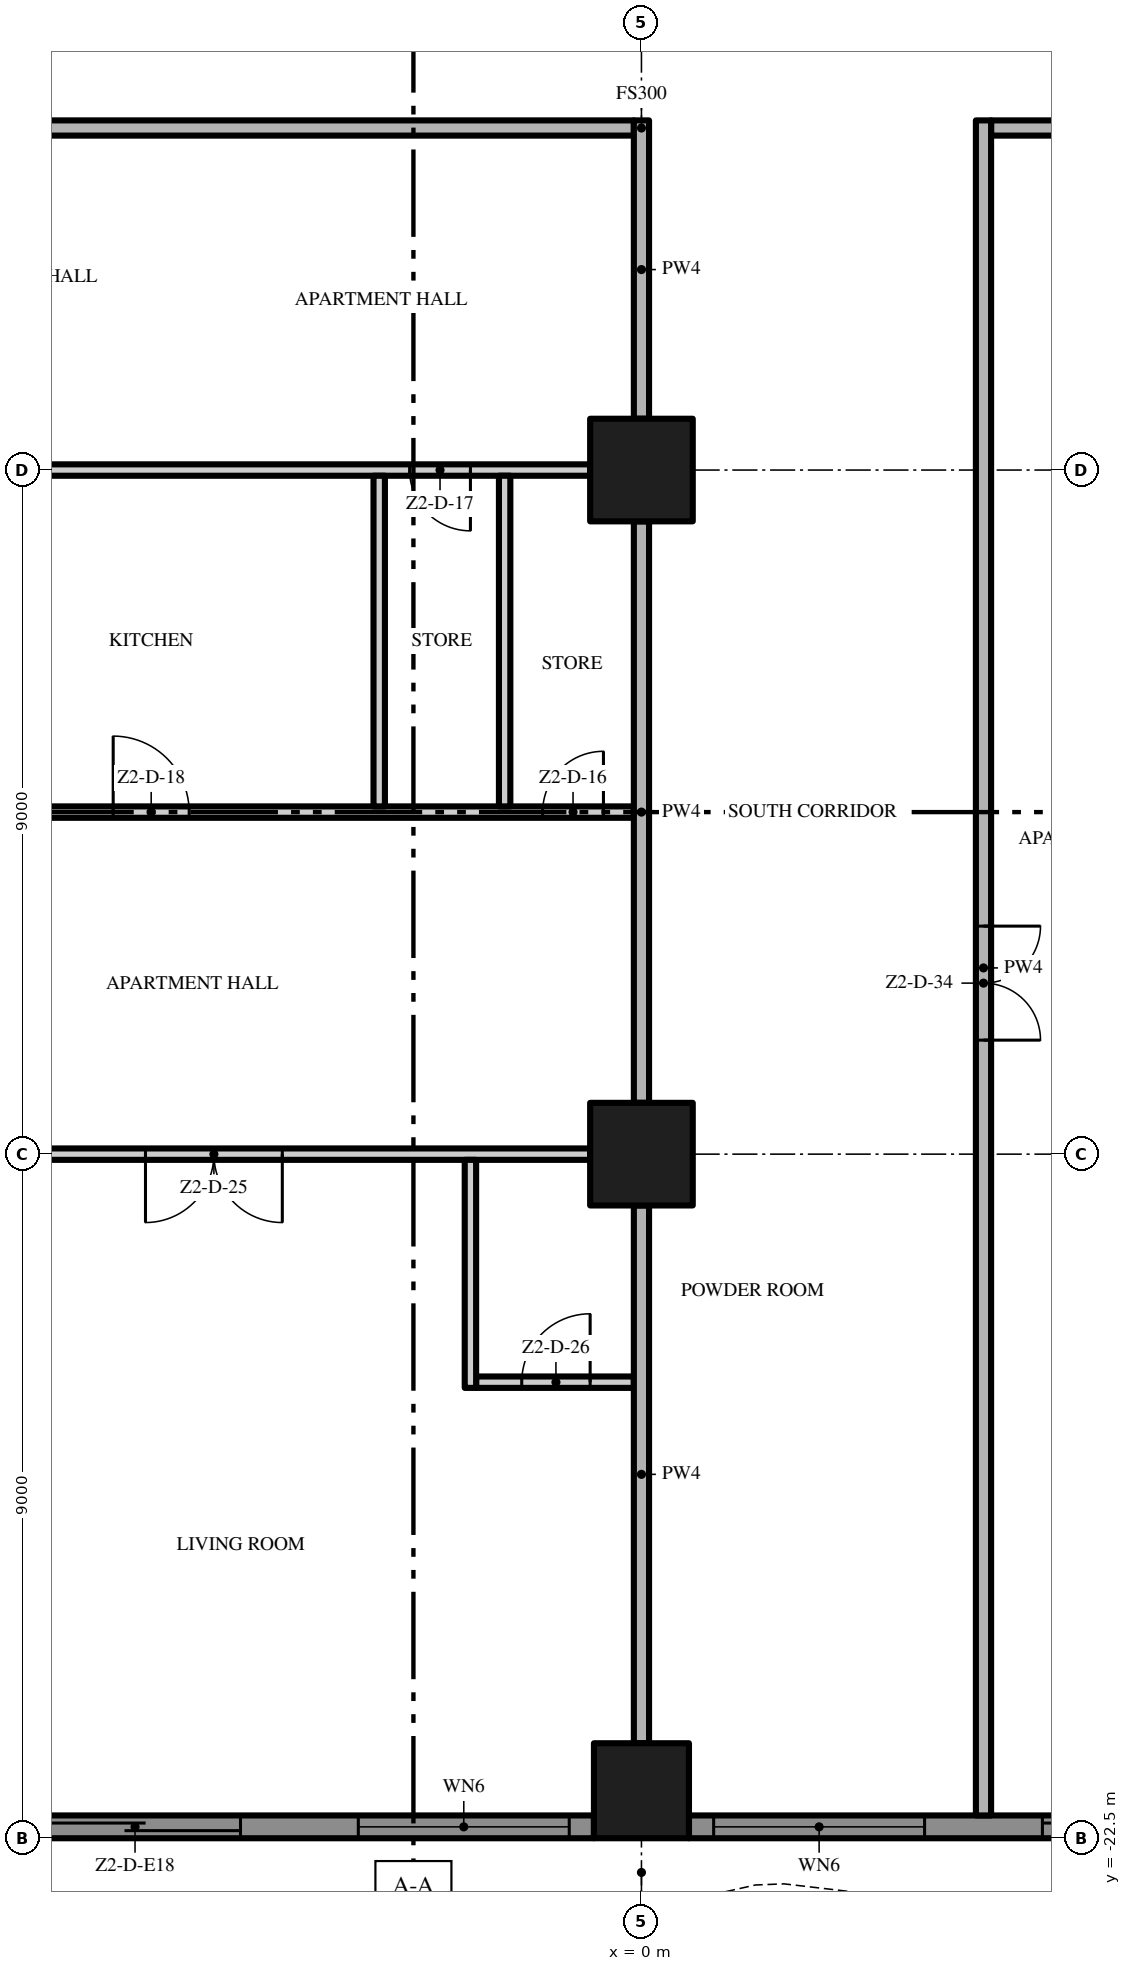
"""IFC4 building model, lengths in metres.
Left out: names, types, materials, properties, quantities, classifications, styles, units other than length and angle.
Written with IfcOpenShell. Run it as: python <this file> out.ifc"""

import sys

from ifc_helpers import new_model, si_unit, direction, frame, frame_2d, origin, origin_2d, place, context, subcontext, project, spatial, polyline, rectangle, outline, extrude, element, fill, save


model = new_model("IFC4")
c1 = context("Model", 3, precision=1e-05, world=origin(), true_north=direction((0.0, 1.0)))
c2 = subcontext(c1, "Body", "Model", "MODEL_VIEW")
j1 = project(units=[si_unit("LENGTHUNIT", "METRE"), si_unit("PLANEANGLEUNIT", "RADIAN")], contexts=[c1])
p1 = place(None, origin())
s1 = spatial("IfcSite", under=j1, at=p1, CompositionType="ELEMENT")
p2 = place(p1, origin())
s2 = spatial("IfcBuilding", under=s1, at=p2, CompositionType="ELEMENT")
p3 = place(p2, frame((0.0, 0.0, 111.2)))
s3 = spatial("IfcBuildingStorey", under=s2, at=p3, CompositionType="ELEMENT", Elevation=111.2)
p4 = place(p3, frame((0.0, -13.5, 0.0), z_axis=(0.0, 0.0, 1.0), x_axis=(1.0, 0.0, 0.0)))
e1 = element("IfcColumn", 1, at=p4, inside=s3, PredefinedType="COLUMN", context=c2, shape_type="SweptSolid", body=[
    extrude(rectangle(XDim=1.35, YDim=1.35, at=origin_2d()), origin(), (0.0, 0.0, 1.0), 3.5),
])
p5 = place(p3, frame((0.0, -21.875, 0.0), z_axis=(0.0, 0.0, 1.0), x_axis=(1.0, 0.0, 0.0)))
e2 = element("IfcColumn", 2, at=p5, inside=s3, PredefinedType="COLUMN", context=c2, shape_type="SweptSolid", body=[
    extrude(rectangle(XDim=1.25, YDim=1.25, at=origin_2d()), origin(), (0.0, 0.0, 1.0), 3.5),
])
p6 = place(p3, frame((0.0, -4.5, 0.0), z_axis=(0.0, 0.0, 1.0), x_axis=(1.0, 0.0, 0.0)))
e3 = element("IfcColumn", 3, at=p6, inside=s3, PredefinedType="COLUMN", context=c2, shape_type="SweptSolid", body=[
    extrude(rectangle(XDim=1.35, YDim=1.35, at=origin_2d()), origin(), (0.0, 0.0, 1.0), 3.5),
])
p7 = place(p3, frame((-0.625, -22.35, 0.0), z_axis=(0.0, 0.0, 1.0), x_axis=(-1.0, 0.0, 0.0)))
e4 = element("IfcWall", 4, at=p7, inside=s3, PredefinedType="SOLIDWALL", context=c2, shape_type="SweptSolid", body=[
    extrude(rectangle(XDim=7.75, YDim=0.3, at=frame_2d((3.875, 0.0))), origin(), (0.0, 0.0, 1.0), 3.5),
])
p8 = place(p7, frame((4.65, 0.0, 0.0)))
e5 = element("IfcOpeningElement", 5, at=p8, cuts=e4, PredefinedType="OPENING", context=c2, shape_type="SweptSolid", body=[
    extrude(rectangle(XDim=2.775, YDim=2.4, at=frame_2d((1.387, 1.2))), frame((0.0, 0.16, 0.0), z_axis=(0.0, -1.0, 0.0), x_axis=(1.0, 0.0, 0.0)), (0.0, 0.0, 1.0), 0.32),
])
p9 = place(p7, frame((0.325, 0.0, 0.45)))
e6 = element("IfcOpeningElement", 6, at=p9, cuts=e4, PredefinedType="OPENING", context=c2, shape_type="SweptSolid", body=[
    extrude(rectangle(XDim=2.775, YDim=2.65, at=frame_2d((1.387, 1.325))), frame((0.0, 0.16, 0.0), z_axis=(0.0, -1.0, 0.0), x_axis=(1.0, 0.0, 0.0)), (0.0, 0.0, 1.0), 0.32),
])
p10 = place(p3, frame((8.375, -22.35, 0.0), z_axis=(0.0, 0.0, 1.0), x_axis=(-1.0, 0.0, 0.0)))
e7 = element("IfcWall", 7, at=p10, inside=s3, PredefinedType="SOLIDWALL", context=c2, shape_type="SweptSolid", body=[
    extrude(rectangle(XDim=7.75, YDim=0.3, at=frame_2d((3.875, 0.0))), origin(), (0.0, 0.0, 1.0), 3.5),
])
p11 = place(p10, frame((4.65, 0.0, 0.45)))
e8 = element("IfcOpeningElement", 8, at=p11, cuts=e7, PredefinedType="OPENING", context=c2, shape_type="SweptSolid", body=[
    extrude(rectangle(XDim=2.775, YDim=2.65, at=frame_2d((1.387, 1.325))), frame((0.0, 0.16, 0.0), z_axis=(0.0, -1.0, 0.0), x_axis=(1.0, 0.0, 0.0)), (0.0, 0.0, 1.0), 0.32),
])
p12 = place(p10, frame((0.325, 0.0, 0.0)))
e9 = element("IfcOpeningElement", 9, at=p12, cuts=e7, PredefinedType="OPENING", context=c2, shape_type="SweptSolid", body=[
    extrude(rectangle(XDim=2.775, YDim=2.4, at=frame_2d((1.387, 1.2))), frame((0.0, 0.16, 0.0), z_axis=(0.0, -1.0, 0.0), x_axis=(1.0, 0.0, 0.0)), (0.0, 0.0, 1.0), 0.32),
])
p13 = place(p3, origin())
e10 = element("IfcWall", 10, at=p13, inside=s3, PredefinedType="USERDEFINED", context=c2, shape_type="SweptSolid", body=[
    extrude(outline(polyline([(-22.5, -25.149), (-21.0, -25.485), (-20.625, -25.5), (-19.5, -25.369), (-18.0, -24.845), (-16.5, -24.112), (-15.0, -23.451), (-13.5, -23.115), (-13.125, -23.1), (-12.0, -23.231), (-10.5, -23.755), (-9.0, -24.488), (-7.5, -25.149), (-6.0, -25.485), (-5.625, -25.5), (-4.5, -25.369), (-3.0, -24.845), (-1.5, -24.112), (0.0, -23.451), (1.5, -23.115), (1.875, -23.1), (3.0, -23.231), (4.5, -23.755), (6.0, -24.488), (7.5, -25.149), (9.0, -25.485), (9.375, -25.5), (10.5, -25.369), (12.0, -24.845), (13.5, -24.112), (15.0, -23.451), (16.5, -23.115), (16.875, -23.1), (18.0, -23.231), (19.5, -23.755), (21.0, -24.488), (22.5, -25.149), (22.601, -24.92), (21.105, -24.261), (19.596, -23.524), (18.056, -22.986), (16.885, -22.849), (16.467, -22.866), (14.921, -23.213), (13.395, -23.885), (11.904, -24.614), (10.444, -25.124), (9.365, -25.249), (9.033, -25.236), (7.579, -24.91), (6.105, -24.261), (4.596, -23.524), (3.056, -22.986), (1.885, -22.849), (1.467, -22.866), (-0.079, -23.213), (-1.605, -23.885), (-3.096, -24.614), (-4.556, -25.124), (-5.635, -25.249), (-5.967, -25.236), (-7.421, -24.91), (-8.895, -24.261), (-10.404, -23.524), (-11.944, -22.986), (-13.115, -22.849), (-13.533, -22.866), (-15.079, -23.213), (-16.605, -23.885), (-18.096, -24.614), (-19.556, -25.124), (-20.635, -25.249), (-20.967, -25.236), (-22.445, -24.905), (-22.5, -25.149)])), origin(), (0.0, 0.0, 1.0), 0.9),
])
p14 = place(p3, frame((-2.175, -16.5, 0.0), z_axis=(0.0, 0.0, 1.0), x_axis=(1.0, 0.0, 0.0)))
e11 = element("IfcWall", 11, at=p14, inside=s3, PredefinedType="PARTITIONING", context=c2, shape_type="SweptSolid", body=[
    extrude(rectangle(XDim=2.075, YDim=0.15, at=frame_2d((1.038, 0.0))), origin(), (0.0, 0.0, 1.0), 3.5),
])
p15 = place(p14, frame((0.6, 0.0, 0.0)))
e12 = element("IfcOpeningElement", 12, at=p15, cuts=e11, PredefinedType="OPENING", context=c2, shape_type="SweptSolid", body=[
    extrude(rectangle(XDim=0.9, YDim=2.1, at=frame_2d((0.45, 1.05))), frame((0.0, 0.085, 0.0), z_axis=(0.0, -1.0, 0.0), x_axis=(1.0, 0.0, 0.0)), (0.0, 0.0, 1.0), 0.17),
])
p16 = place(p3, frame((-0.675, -13.5, 0.0), z_axis=(0.0, 0.0, 1.0), x_axis=(-1.0, 0.0, 0.0)))
e13 = element("IfcWall", 13, at=p16, inside=s3, PredefinedType="PARTITIONING", context=c2, shape_type="SweptSolid", body=[
    extrude(rectangle(XDim=7.65, YDim=0.15, at=frame_2d((3.825, 0.0))), origin(), (0.0, 0.0, 1.0), 3.5),
])
p17 = place(p16, frame((4.05, 0.0, 0.0)))
e14 = element("IfcOpeningElement", 14, at=p17, cuts=e13, PredefinedType="OPENING", context=c2, shape_type="SweptSolid", body=[
    extrude(rectangle(XDim=1.8, YDim=2.4, at=frame_2d((0.9, 1.2))), frame((0.0, 0.085, 0.0), z_axis=(0.0, -1.0, 0.0), x_axis=(1.0, 0.0, 0.0)), (0.0, 0.0, 1.0), 0.17),
])
p18 = place(p3, frame((-11.625, -9.0, 0.0), z_axis=(0.0, 0.0, 1.0), x_axis=(1.0, 0.0, 0.0)))
e15 = element("IfcWall", 15, at=p18, inside=s3, PredefinedType="PARTITIONING", context=c2, shape_type="SweptSolid", body=[
    extrude(rectangle(XDim=11.525, YDim=0.15, at=frame_2d((5.763, 0.0))), origin(), (0.0, 0.0, 1.0), 3.5),
])
p19 = place(p18, frame((10.325, 0.0, 0.0)))
e16 = element("IfcOpeningElement", 16, at=p19, cuts=e15, PredefinedType="OPENING", context=c2, shape_type="SweptSolid", body=[
    extrude(rectangle(XDim=0.8, YDim=2.0, at=frame_2d((0.4, 1.0))), frame((0.0, 0.085, 0.0), z_axis=(0.0, -1.0, 0.0), x_axis=(1.0, 0.0, 0.0)), (0.0, 0.0, 1.0), 0.17),
])
p20 = place(p18, frame((4.675, 0.0, 0.0)))
e17 = element("IfcOpeningElement", 17, at=p20, cuts=e15, PredefinedType="OPENING", context=c2, shape_type="SweptSolid", body=[
    extrude(rectangle(XDim=1.0, YDim=2.4, at=frame_2d((0.5, 1.2))), frame((0.0, 0.085, 0.0), z_axis=(0.0, -1.0, 0.0), x_axis=(1.0, 0.0, 0.0)), (0.0, 0.0, 1.0), 0.17),
])
p21 = place(p3, frame((-0.675, -4.5, 0.0), z_axis=(0.0, 0.0, 1.0), x_axis=(-1.0, 0.0, 0.0)))
e18 = element("IfcWall", 18, at=p21, inside=s3, PredefinedType="PARTITIONING", context=c2, shape_type="SweptSolid", body=[
    extrude(rectangle(XDim=7.65, YDim=0.15, at=frame_2d((3.825, 0.0))), origin(), (0.0, 0.0, 1.0), 3.5),
])
p22 = place(p21, frame((1.575, 0.0, 0.0)))
e19 = element("IfcOpeningElement", 19, at=p22, cuts=e18, PredefinedType="OPENING", context=c2, shape_type="SweptSolid", body=[
    extrude(rectangle(XDim=0.8, YDim=2.0, at=frame_2d((0.4, 1.0))), frame((0.0, 0.085, 0.0), z_axis=(0.0, -1.0, 0.0), x_axis=(1.0, 0.0, 0.0)), (0.0, 0.0, 1.0), 0.17),
])
p23 = place(p3, frame((-0.1, 0.0, 0.0), z_axis=(0.0, 0.0, 1.0), x_axis=(-1.0, 0.0, 0.0)))
e20 = element("IfcWall", 20, at=p23, inside=s3, PredefinedType="PARTITIONING", context=c2, shape_type="SweptSolid", body=[
    extrude(rectangle(XDim=17.3, YDim=0.2, at=frame_2d((8.65, 0.0))), origin(), (0.0, 0.0, 1.0), 3.5),
])
p24 = place(p23, frame((8.15, 0.0, 0.0)))
e21 = element("IfcOpeningElement", 21, at=p24, cuts=e20, PredefinedType="OPENING", context=c2, shape_type="SweptSolid", body=[
    extrude(rectangle(XDim=1.5, YDim=2.4, at=frame_2d((0.75, 1.2))), frame((0.0, 0.11, 0.0), z_axis=(0.0, -1.0, 0.0), x_axis=(1.0, 0.0, 0.0)), (0.0, 0.0, 1.0), 0.22),
])
p25 = place(p3, frame((4.6, 0.0, 0.0), z_axis=(0.0, 0.0, 1.0), x_axis=(1.0, 0.0, 0.0)))
e22 = element("IfcWall", 22, at=p25, inside=s3, PredefinedType="PARTITIONING", context=c2, shape_type="SweptSolid", body=[
    extrude(rectangle(XDim=12.8, YDim=0.2, at=frame_2d((6.4, 0.0))), origin(), (0.0, 0.0, 1.0), 3.5),
])
p26 = place(p3, frame((-3.45, -8.925, 0.0), z_axis=(0.0, 0.0, 1.0), x_axis=(0.0, 1.0, 0.0)))
e23 = element("IfcWall", 23, at=p26, inside=s3, PredefinedType="PARTITIONING", context=c2, shape_type="SweptSolid", body=[
    extrude(rectangle(XDim=4.35, YDim=0.15, at=frame_2d((2.175, 0.0))), origin(), (0.0, 0.0, 1.0), 3.5),
])
p27 = place(p3, frame((-2.25, -16.575, 0.0), z_axis=(0.0, 0.0, 1.0), x_axis=(0.0, 1.0, 0.0)))
e24 = element("IfcWall", 24, at=p27, inside=s3, PredefinedType="PARTITIONING", context=c2, shape_type="SweptSolid", body=[
    extrude(rectangle(XDim=3.0, YDim=0.15, at=frame_2d((1.5, 0.0))), origin(), (0.0, 0.0, 1.0), 3.5),
])
p28 = place(p3, frame((-1.8, -8.925, 0.0), z_axis=(0.0, 0.0, 1.0), x_axis=(0.0, 1.0, 0.0)))
e25 = element("IfcWall", 25, at=p28, inside=s3, PredefinedType="PARTITIONING", context=c2, shape_type="SweptSolid", body=[
    extrude(rectangle(XDim=4.35, YDim=0.15, at=frame_2d((2.175, 0.0))), origin(), (0.0, 0.0, 1.0), 3.5),
])
p29 = place(p3, frame((0.0, -21.25, 0.0), z_axis=(0.0, 0.0, 1.0), x_axis=(0.0, 1.0, 0.0)))
e26 = element("IfcWall", 26, at=p29, inside=s3, PredefinedType="PARTITIONING", context=c2, shape_type="SweptSolid", body=[
    extrude(rectangle(XDim=7.075, YDim=0.2, at=frame_2d((3.538, 0.0))), origin(), (0.0, 0.0, 1.0), 3.5),
])
p30 = place(p3, frame((0.0, -12.825, 0.0), z_axis=(0.0, 0.0, 1.0), x_axis=(0.0, 1.0, 0.0)))
e27 = element("IfcWall", 27, at=p30, inside=s3, PredefinedType="PARTITIONING", context=c2, shape_type="SweptSolid", body=[
    extrude(rectangle(XDim=7.65, YDim=0.2, at=frame_2d((3.825, 0.0))), origin(), (0.0, 0.0, 1.0), 3.5),
])
p31 = place(p3, frame((0.0, -3.825, 0.0), z_axis=(0.0, 0.0, 1.0), x_axis=(0.0, 1.0, 0.0)))
e28 = element("IfcWall", 28, at=p31, inside=s3, PredefinedType="PARTITIONING", context=c2, shape_type="SweptSolid", body=[
    extrude(rectangle(XDim=3.925, YDim=0.2, at=frame_2d((1.962, 0.0))), origin(), (0.0, 0.0, 1.0), 3.5),
])
p32 = place(p3, frame((4.5, 0.1, 0.0), z_axis=(0.0, 0.0, 1.0), x_axis=(0.0, -1.0, 0.0)))
e29 = element("IfcWall", 29, at=p32, inside=s3, PredefinedType="PARTITIONING", context=c2, shape_type="SweptSolid", body=[
    extrude(rectangle(XDim=22.3, YDim=0.2, at=frame_2d((11.15, 0.0))), origin(), (0.0, 0.0, 1.0), 3.5),
])
p33 = place(p32, frame((10.6, 0.0, 0.0)))
e30 = element("IfcOpeningElement", 30, at=p33, cuts=e29, PredefinedType="OPENING", context=c2, shape_type="SweptSolid", body=[
    extrude(rectangle(XDim=1.5, YDim=2.4, at=frame_2d((0.75, 1.2))), frame((0.0, 0.11, 0.0), z_axis=(0.0, -1.0, 0.0), x_axis=(1.0, 0.0, 0.0)), (0.0, 0.0, 1.0), 0.22),
])
p34 = place(p8, origin())
e31 = element("IfcDoor", 31, at=p34, inside=s3, OperationType="SINGLE_SWING_LEFT", PredefinedType="DOOR", context=c2, shape_type="SweptSolid", body=[
    extrude(rectangle(XDim=2.775, YDim=2.4, at=frame_2d((1.387, 1.2))), frame((0.0, 0.025, 0.0), z_axis=(0.0, -1.0, 0.0), x_axis=(1.0, 0.0, 0.0)), (0.0, 0.0, 1.0), 0.05),
])
fill(e5, e31)
p35 = place(p9, origin())
e32 = element("IfcWindow", 32, at=p35, inside=s3, PartitioningType="SINGLE_PANEL", PredefinedType="WINDOW", context=c2, shape_type="SweptSolid", body=[
    extrude(rectangle(XDim=2.775, YDim=2.65, at=frame_2d((1.387, 1.325))), frame((0.0, 0.03, 0.0), z_axis=(0.0, -1.0, 0.0), x_axis=(1.0, 0.0, 0.0)), (0.0, 0.0, 1.0), 0.06),
])
fill(e6, e32)
p36 = place(p11, origin())
e33 = element("IfcWindow", 33, at=p36, inside=s3, PartitioningType="SINGLE_PANEL", PredefinedType="WINDOW", context=c2, shape_type="SweptSolid", body=[
    extrude(rectangle(XDim=2.775, YDim=2.65, at=frame_2d((1.387, 1.325))), frame((0.0, 0.03, 0.0), z_axis=(0.0, -1.0, 0.0), x_axis=(1.0, 0.0, 0.0)), (0.0, 0.0, 1.0), 0.06),
])
fill(e8, e33)
p37 = place(p12, origin())
e34 = element("IfcDoor", 34, at=p37, inside=s3, OperationType="SINGLE_SWING_LEFT", PredefinedType="DOOR", context=c2, shape_type="SweptSolid", body=[
    extrude(rectangle(XDim=2.775, YDim=2.4, at=frame_2d((1.387, 1.2))), frame((0.0, 0.025, 0.0), z_axis=(0.0, -1.0, 0.0), x_axis=(1.0, 0.0, 0.0)), (0.0, 0.0, 1.0), 0.05),
])
fill(e9, e34)
p38 = place(p19, origin())
e35 = element("IfcDoor", 35, at=p38, inside=s3, OperationType="SINGLE_SWING_RIGHT", PredefinedType="DOOR", context=c2, shape_type="SweptSolid", body=[
    extrude(rectangle(XDim=0.8, YDim=2.0, at=frame_2d((0.4, 1.0))), frame((0.0, 0.025, 0.0), z_axis=(0.0, -1.0, 0.0), x_axis=(1.0, 0.0, 0.0)), (0.0, 0.0, 1.0), 0.05),
])
fill(e16, e35)
p39 = place(p22, origin())
e36 = element("IfcDoor", 36, at=p39, inside=s3, OperationType="SINGLE_SWING_LEFT", PredefinedType="DOOR", context=c2, shape_type="SweptSolid", body=[
    extrude(rectangle(XDim=0.8, YDim=2.0, at=frame_2d((0.4, 1.0))), frame((0.0, 0.025, 0.0), z_axis=(0.0, -1.0, 0.0), x_axis=(1.0, 0.0, 0.0)), (0.0, 0.0, 1.0), 0.05),
])
fill(e19, e36)
p40 = place(p20, origin())
e37 = element("IfcDoor", 37, at=p40, inside=s3, OperationType="SINGLE_SWING_LEFT", PredefinedType="DOOR", context=c2, shape_type="SweptSolid", body=[
    extrude(rectangle(XDim=1.0, YDim=2.4, at=frame_2d((0.5, 1.2))), frame((0.0, 0.025, 0.0), z_axis=(0.0, -1.0, 0.0), x_axis=(1.0, 0.0, 0.0)), (0.0, 0.0, 1.0), 0.05),
])
fill(e17, e37)
p41 = place(p17, origin())
e38 = element("IfcDoor", 38, at=p41, inside=s3, OperationType="DOUBLE_DOOR_SINGLE_SWING", PredefinedType="DOOR", context=c2, shape_type="SweptSolid", body=[
    extrude(rectangle(XDim=1.8, YDim=2.4, at=frame_2d((0.9, 1.2))), frame((0.0, 0.025, 0.0), z_axis=(0.0, -1.0, 0.0), x_axis=(1.0, 0.0, 0.0)), (0.0, 0.0, 1.0), 0.05),
])
fill(e14, e38)
p42 = place(p15, origin())
e39 = element("IfcDoor", 39, at=p42, inside=s3, OperationType="SINGLE_SWING_RIGHT", PredefinedType="DOOR", context=c2, shape_type="SweptSolid", body=[
    extrude(rectangle(XDim=0.9, YDim=2.1, at=frame_2d((0.45, 1.05))), frame((0.0, 0.025, 0.0), z_axis=(0.0, -1.0, 0.0), x_axis=(1.0, 0.0, 0.0)), (0.0, 0.0, 1.0), 0.05),
])
fill(e12, e39)
p43 = place(p33, origin())
e40 = element("IfcDoor", 40, at=p43, inside=s3, OperationType="DOUBLE_DOOR_SINGLE_SWING", PredefinedType="DOOR", context=c2, shape_type="SweptSolid", body=[
    extrude(rectangle(XDim=1.5, YDim=2.4, at=frame_2d((0.75, 1.2))), frame((0.0, 0.025, 0.0), z_axis=(0.0, -1.0, 0.0), x_axis=(1.0, 0.0, 0.0)), (0.0, 0.0, 1.0), 0.05),
])
fill(e30, e40)
save(model, sys.argv[1])
